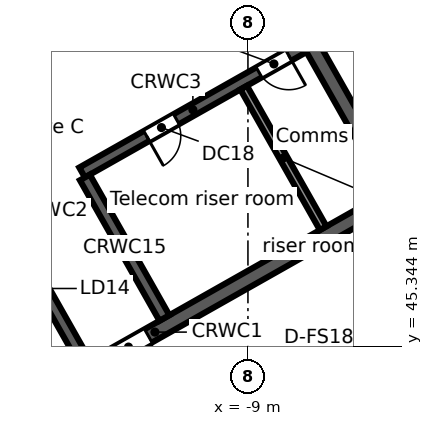
"""IFC4 building model, lengths in metres.
Left out: names, types, materials, properties, quantities, classifications, styles, units other than length and angle.
Written with IfcOpenShell. Run it as: python <this file> out.ifc"""

import sys

from ifc_helpers import new_model, si_unit, direction, frame, frame_2d, origin, place, context, subcontext, project, spatial, rectangle, extrude, element, fill, save


model = new_model("IFC4")
c1 = context("Model", 3, precision=1e-05, world=origin(), true_north=direction((0.0, 1.0)))
c2 = subcontext(c1, "Body", "Model", "MODEL_VIEW")
j1 = project(units=[si_unit("LENGTHUNIT", "METRE"), si_unit("PLANEANGLEUNIT", "RADIAN")], contexts=[c1])
p1 = place(None, origin())
s1 = spatial("IfcSite", under=j1, at=p1, CompositionType="ELEMENT")
p2 = place(p1, origin())
s2 = spatial("IfcBuilding", under=s1, at=p2, CompositionType="ELEMENT")
p3 = place(p2, frame((0.0, 0.0, 281.7)))
s3 = spatial("IfcBuildingStorey", under=s2, at=p3, CompositionType="ELEMENT", Elevation=281.7)
p4 = place(p3, frame((-58.732, 38.771, 0.0), z_axis=(0.0, 0.0, 1.0), x_axis=(0.870355615581, 0.492423702137, 0.0)))
e1 = element("IfcWall", 1, at=p4, inside=s3, PredefinedType="STANDARD", context=c2, shape_type="SweptSolid", body=[
    extrude(rectangle(XDim=64.052, YDim=0.25, at=frame_2d((32.026, 0.0))), origin(), (0.0, 0.0, 1.0), 3.45),
])
p5 = place(p4, frame((61.259, 0.0, 0.8)))
e2 = element("IfcOpeningElement", 2, at=p5, cuts=e1, PredefinedType="OPENING", context=c2, shape_type="SweptSolid", body=[
    extrude(rectangle(XDim=2.4, YDim=2.2, at=frame_2d((1.2, 1.1))), frame((0.0, 0.135, 0.0), z_axis=(0.0, -1.0, 0.0), x_axis=(1.0, 0.0, 0.0)), (0.0, 0.0, 1.0), 0.27),
])
p6 = place(p4, frame((58.216, 0.0, 0.8)))
e3 = element("IfcOpeningElement", 3, at=p6, cuts=e1, PredefinedType="OPENING", context=c2, shape_type="SweptSolid", body=[
    extrude(rectangle(XDim=2.4, YDim=2.2, at=frame_2d((1.2, 1.1))), frame((0.0, 0.135, 0.0), z_axis=(0.0, -1.0, 0.0), x_axis=(1.0, 0.0, 0.0)), (0.0, 0.0, 1.0), 0.27),
])
p7 = place(p4, frame((55.173, 0.0, 0.8)))
e4 = element("IfcOpeningElement", 4, at=p7, cuts=e1, PredefinedType="OPENING", context=c2, shape_type="SweptSolid", body=[
    extrude(rectangle(XDim=2.4, YDim=2.2, at=frame_2d((1.2, 1.1))), frame((0.0, 0.135, 0.0), z_axis=(0.0, -1.0, 0.0), x_axis=(1.0, 0.0, 0.0)), (0.0, 0.0, 1.0), 0.27),
])
p8 = place(p4, frame((52.129, 0.0, 0.8)))
e5 = element("IfcOpeningElement", 5, at=p8, cuts=e1, PredefinedType="OPENING", context=c2, shape_type="SweptSolid", body=[
    extrude(rectangle(XDim=2.4, YDim=2.2, at=frame_2d((1.2, 1.1))), frame((0.0, 0.135, 0.0), z_axis=(0.0, -1.0, 0.0), x_axis=(1.0, 0.0, 0.0)), (0.0, 0.0, 1.0), 0.27),
])
p9 = place(p4, frame((49.086, 0.0, 0.8)))
e6 = element("IfcOpeningElement", 6, at=p9, cuts=e1, PredefinedType="OPENING", context=c2, shape_type="SweptSolid", body=[
    extrude(rectangle(XDim=2.4, YDim=2.2, at=frame_2d((1.2, 1.1))), frame((0.0, 0.135, 0.0), z_axis=(0.0, -1.0, 0.0), x_axis=(1.0, 0.0, 0.0)), (0.0, 0.0, 1.0), 0.27),
])
p10 = place(p4, frame((46.043, 0.0, 0.8)))
e7 = element("IfcOpeningElement", 7, at=p10, cuts=e1, PredefinedType="OPENING", context=c2, shape_type="SweptSolid", body=[
    extrude(rectangle(XDim=2.4, YDim=2.2, at=frame_2d((1.2, 1.1))), frame((0.0, 0.135, 0.0), z_axis=(0.0, -1.0, 0.0), x_axis=(1.0, 0.0, 0.0)), (0.0, 0.0, 1.0), 0.27),
])
p11 = place(p4, frame((43.0, 0.0, 0.8)))
e8 = element("IfcOpeningElement", 8, at=p11, cuts=e1, PredefinedType="OPENING", context=c2, shape_type="SweptSolid", body=[
    extrude(rectangle(XDim=2.4, YDim=2.2, at=frame_2d((1.2, 1.1))), frame((0.0, 0.135, 0.0), z_axis=(0.0, -1.0, 0.0), x_axis=(1.0, 0.0, 0.0)), (0.0, 0.0, 1.0), 0.27),
])
p12 = place(p4, frame((39.956, 0.0, 0.8)))
e9 = element("IfcOpeningElement", 9, at=p12, cuts=e1, PredefinedType="OPENING", context=c2, shape_type="SweptSolid", body=[
    extrude(rectangle(XDim=2.4, YDim=2.2, at=frame_2d((1.2, 1.1))), frame((0.0, 0.135, 0.0), z_axis=(0.0, -1.0, 0.0), x_axis=(1.0, 0.0, 0.0)), (0.0, 0.0, 1.0), 0.27),
])
p13 = place(p4, frame((36.913, 0.0, 0.8)))
e10 = element("IfcOpeningElement", 10, at=p13, cuts=e1, PredefinedType="OPENING", context=c2, shape_type="SweptSolid", body=[
    extrude(rectangle(XDim=2.4, YDim=2.2, at=frame_2d((1.2, 1.1))), frame((0.0, 0.135, 0.0), z_axis=(0.0, -1.0, 0.0), x_axis=(1.0, 0.0, 0.0)), (0.0, 0.0, 1.0), 0.27),
])
p14 = place(p4, frame((33.87, 0.0, 0.8)))
e11 = element("IfcOpeningElement", 11, at=p14, cuts=e1, PredefinedType="OPENING", context=c2, shape_type="SweptSolid", body=[
    extrude(rectangle(XDim=2.4, YDim=2.2, at=frame_2d((1.2, 1.1))), frame((0.0, 0.135, 0.0), z_axis=(0.0, -1.0, 0.0), x_axis=(1.0, 0.0, 0.0)), (0.0, 0.0, 1.0), 0.27),
])
p15 = place(p4, frame((30.826, 0.0, 0.8)))
e12 = element("IfcOpeningElement", 12, at=p15, cuts=e1, PredefinedType="OPENING", context=c2, shape_type="SweptSolid", body=[
    extrude(rectangle(XDim=2.4, YDim=2.2, at=frame_2d((1.2, 1.1))), frame((0.0, 0.135, 0.0), z_axis=(0.0, -1.0, 0.0), x_axis=(1.0, 0.0, 0.0)), (0.0, 0.0, 1.0), 0.27),
])
p16 = place(p4, frame((27.783, 0.0, 0.8)))
e13 = element("IfcOpeningElement", 13, at=p16, cuts=e1, PredefinedType="OPENING", context=c2, shape_type="SweptSolid", body=[
    extrude(rectangle(XDim=2.4, YDim=2.2, at=frame_2d((1.2, 1.1))), frame((0.0, 0.135, 0.0), z_axis=(0.0, -1.0, 0.0), x_axis=(1.0, 0.0, 0.0)), (0.0, 0.0, 1.0), 0.27),
])
p17 = place(p4, frame((24.74, 0.0, 0.8)))
e14 = element("IfcOpeningElement", 14, at=p17, cuts=e1, PredefinedType="OPENING", context=c2, shape_type="SweptSolid", body=[
    extrude(rectangle(XDim=2.4, YDim=2.2, at=frame_2d((1.2, 1.1))), frame((0.0, 0.135, 0.0), z_axis=(0.0, -1.0, 0.0), x_axis=(1.0, 0.0, 0.0)), (0.0, 0.0, 1.0), 0.27),
])
p18 = place(p4, frame((21.696, 0.0, 0.8)))
e15 = element("IfcOpeningElement", 15, at=p18, cuts=e1, PredefinedType="OPENING", context=c2, shape_type="SweptSolid", body=[
    extrude(rectangle(XDim=2.4, YDim=2.2, at=frame_2d((1.2, 1.1))), frame((0.0, 0.135, 0.0), z_axis=(0.0, -1.0, 0.0), x_axis=(1.0, 0.0, 0.0)), (0.0, 0.0, 1.0), 0.27),
])
p19 = place(p4, frame((18.653, 0.0, 0.8)))
e16 = element("IfcOpeningElement", 16, at=p19, cuts=e1, PredefinedType="OPENING", context=c2, shape_type="SweptSolid", body=[
    extrude(rectangle(XDim=2.4, YDim=2.2, at=frame_2d((1.2, 1.1))), frame((0.0, 0.135, 0.0), z_axis=(0.0, -1.0, 0.0), x_axis=(1.0, 0.0, 0.0)), (0.0, 0.0, 1.0), 0.27),
])
p20 = place(p4, frame((15.61, 0.0, 0.8)))
e17 = element("IfcOpeningElement", 17, at=p20, cuts=e1, PredefinedType="OPENING", context=c2, shape_type="SweptSolid", body=[
    extrude(rectangle(XDim=2.4, YDim=2.2, at=frame_2d((1.2, 1.1))), frame((0.0, 0.135, 0.0), z_axis=(0.0, -1.0, 0.0), x_axis=(1.0, 0.0, 0.0)), (0.0, 0.0, 1.0), 0.27),
])
p21 = place(p4, frame((12.567, 0.0, 0.8)))
e18 = element("IfcOpeningElement", 18, at=p21, cuts=e1, PredefinedType="OPENING", context=c2, shape_type="SweptSolid", body=[
    extrude(rectangle(XDim=2.4, YDim=2.2, at=frame_2d((1.2, 1.1))), frame((0.0, 0.135, 0.0), z_axis=(0.0, -1.0, 0.0), x_axis=(1.0, 0.0, 0.0)), (0.0, 0.0, 1.0), 0.27),
])
p22 = place(p4, frame((9.523, 0.0, 0.8)))
e19 = element("IfcOpeningElement", 19, at=p22, cuts=e1, PredefinedType="OPENING", context=c2, shape_type="SweptSolid", body=[
    extrude(rectangle(XDim=2.4, YDim=2.2, at=frame_2d((1.2, 1.1))), frame((0.0, 0.135, 0.0), z_axis=(0.0, -1.0, 0.0), x_axis=(1.0, 0.0, 0.0)), (0.0, 0.0, 1.0), 0.27),
])
p23 = place(p4, frame((6.48, 0.0, 0.8)))
e20 = element("IfcOpeningElement", 20, at=p23, cuts=e1, PredefinedType="OPENING", context=c2, shape_type="SweptSolid", body=[
    extrude(rectangle(XDim=2.4, YDim=2.2, at=frame_2d((1.2, 1.1))), frame((0.0, 0.135, 0.0), z_axis=(0.0, -1.0, 0.0), x_axis=(1.0, 0.0, 0.0)), (0.0, 0.0, 1.0), 0.27),
])
p24 = place(p4, frame((3.437, 0.0, 0.8)))
e21 = element("IfcOpeningElement", 21, at=p24, cuts=e1, PredefinedType="OPENING", context=c2, shape_type="SweptSolid", body=[
    extrude(rectangle(XDim=2.4, YDim=2.2, at=frame_2d((1.2, 1.1))), frame((0.0, 0.135, 0.0), z_axis=(0.0, -1.0, 0.0), x_axis=(1.0, 0.0, 0.0)), (0.0, 0.0, 1.0), 0.27),
])
p25 = place(p4, frame((0.393, 0.0, 0.8)))
e22 = element("IfcOpeningElement", 22, at=p25, cuts=e1, PredefinedType="OPENING", context=c2, shape_type="SweptSolid", body=[
    extrude(rectangle(XDim=2.4, YDim=2.2, at=frame_2d((1.2, 1.1))), frame((0.0, 0.135, 0.0), z_axis=(0.0, -1.0, 0.0), x_axis=(1.0, 0.0, 0.0)), (0.0, 0.0, 1.0), 0.27),
])
p26 = place(p3, frame((-3.017, 46.293, 0.0), z_axis=(0.0, 0.0, 1.0), x_axis=(-0.870355474887, -0.492423950812, 0.0)))
e23 = element("IfcWall", 23, at=p26, inside=s3, PredefinedType="STANDARD", context=c2, shape_type="SweptSolid", body=[
    extrude(rectangle(XDim=40.34, YDim=0.25, at=frame_2d((20.17, 0.0))), origin(), (0.0, 0.0, 1.0), 3.45),
])
p27 = place(p26, frame((37.428, 0.0, 0.8)))
e24 = element("IfcOpeningElement", 24, at=p27, cuts=e23, PredefinedType="OPENING", context=c2, shape_type="SweptSolid", body=[
    extrude(rectangle(XDim=2.4, YDim=2.2, at=frame_2d((1.2, 1.1))), frame((0.0, 0.135, 0.0), z_axis=(0.0, -1.0, 0.0), x_axis=(1.0, 0.0, 0.0)), (0.0, 0.0, 1.0), 0.27),
])
p28 = place(p26, frame((34.372, 0.0, 0.0)))
e25 = element("IfcOpeningElement", 25, at=p28, cuts=e23, PredefinedType="OPENING", context=c2, shape_type="SweptSolid", body=[
    extrude(rectangle(XDim=1.8, YDim=2.4, at=frame_2d((0.9, 1.2))), frame((0.0, 0.135, 0.0), z_axis=(0.0, -1.0, 0.0), x_axis=(1.0, 0.0, 0.0)), (0.0, 0.0, 1.0), 0.27),
])
p29 = place(p26, frame((30.716, 0.0, 0.8)))
e26 = element("IfcOpeningElement", 26, at=p29, cuts=e23, PredefinedType="OPENING", context=c2, shape_type="SweptSolid", body=[
    extrude(rectangle(XDim=2.4, YDim=2.2, at=frame_2d((1.2, 1.1))), frame((0.0, 0.135, 0.0), z_axis=(0.0, -1.0, 0.0), x_axis=(1.0, 0.0, 0.0)), (0.0, 0.0, 1.0), 0.27),
])
p30 = place(p26, frame((27.36, 0.0, 0.8)))
e27 = element("IfcOpeningElement", 27, at=p30, cuts=e23, PredefinedType="OPENING", context=c2, shape_type="SweptSolid", body=[
    extrude(rectangle(XDim=2.4, YDim=2.2, at=frame_2d((1.2, 1.1))), frame((0.0, 0.135, 0.0), z_axis=(0.0, -1.0, 0.0), x_axis=(1.0, 0.0, 0.0)), (0.0, 0.0, 1.0), 0.27),
])
p31 = place(p26, frame((24.304, 0.0, 0.0)))
e28 = element("IfcOpeningElement", 28, at=p31, cuts=e23, PredefinedType="OPENING", context=c2, shape_type="SweptSolid", body=[
    extrude(rectangle(XDim=1.8, YDim=2.4, at=frame_2d((0.9, 1.2))), frame((0.0, 0.135, 0.0), z_axis=(0.0, -1.0, 0.0), x_axis=(1.0, 0.0, 0.0)), (0.0, 0.0, 1.0), 0.27),
])
p32 = place(p26, frame((20.648, 0.0, 0.8)))
e29 = element("IfcOpeningElement", 29, at=p32, cuts=e23, PredefinedType="OPENING", context=c2, shape_type="SweptSolid", body=[
    extrude(rectangle(XDim=2.4, YDim=2.2, at=frame_2d((1.2, 1.1))), frame((0.0, 0.135, 0.0), z_axis=(0.0, -1.0, 0.0), x_axis=(1.0, 0.0, 0.0)), (0.0, 0.0, 1.0), 0.27),
])
p33 = place(p26, frame((17.292, 0.0, 0.8)))
e30 = element("IfcOpeningElement", 30, at=p33, cuts=e23, PredefinedType="OPENING", context=c2, shape_type="SweptSolid", body=[
    extrude(rectangle(XDim=2.4, YDim=2.2, at=frame_2d((1.2, 1.1))), frame((0.0, 0.135, 0.0), z_axis=(0.0, -1.0, 0.0), x_axis=(1.0, 0.0, 0.0)), (0.0, 0.0, 1.0), 0.27),
])
p34 = place(p26, frame((14.236, 0.0, 0.0)))
e31 = element("IfcOpeningElement", 31, at=p34, cuts=e23, PredefinedType="OPENING", context=c2, shape_type="SweptSolid", body=[
    extrude(rectangle(XDim=1.8, YDim=2.4, at=frame_2d((0.9, 1.2))), frame((0.0, 0.135, 0.0), z_axis=(0.0, -1.0, 0.0), x_axis=(1.0, 0.0, 0.0)), (0.0, 0.0, 1.0), 0.27),
])
p35 = place(p26, frame((10.58, 0.0, 0.8)))
e32 = element("IfcOpeningElement", 32, at=p35, cuts=e23, PredefinedType="OPENING", context=c2, shape_type="SweptSolid", body=[
    extrude(rectangle(XDim=2.4, YDim=2.2, at=frame_2d((1.2, 1.1))), frame((0.0, 0.135, 0.0), z_axis=(0.0, -1.0, 0.0), x_axis=(1.0, 0.0, 0.0)), (0.0, 0.0, 1.0), 0.27),
])
p36 = place(p26, frame((7.224, 0.0, 0.8)))
e33 = element("IfcOpeningElement", 33, at=p36, cuts=e23, PredefinedType="OPENING", context=c2, shape_type="SweptSolid", body=[
    extrude(rectangle(XDim=2.4, YDim=2.2, at=frame_2d((1.2, 1.1))), frame((0.0, 0.135, 0.0), z_axis=(0.0, -1.0, 0.0), x_axis=(1.0, 0.0, 0.0)), (0.0, 0.0, 1.0), 0.27),
])
p37 = place(p26, frame((4.168, 0.0, 0.0)))
e34 = element("IfcOpeningElement", 34, at=p37, cuts=e23, PredefinedType="OPENING", context=c2, shape_type="SweptSolid", body=[
    extrude(rectangle(XDim=1.8, YDim=2.4, at=frame_2d((0.9, 1.2))), frame((0.0, 0.135, 0.0), z_axis=(0.0, -1.0, 0.0), x_axis=(1.0, 0.0, 0.0)), (0.0, 0.0, 1.0), 0.27),
])
p38 = place(p26, frame((0.512, 0.0, 0.8)))
e35 = element("IfcOpeningElement", 35, at=p38, cuts=e23, PredefinedType="OPENING", context=c2, shape_type="SweptSolid", body=[
    extrude(rectangle(XDim=2.4, YDim=2.2, at=frame_2d((1.2, 1.1))), frame((0.0, 0.135, 0.0), z_axis=(0.0, -1.0, 0.0), x_axis=(1.0, 0.0, 0.0)), (0.0, 0.0, 1.0), 0.27),
])
p39 = place(p3, frame((-17.975, 42.017, 0.0), z_axis=(0.0, 0.0, 1.0), x_axis=(0.87034965173, 0.492434243055, 0.0)))
e36 = element("IfcWall", 36, at=p39, inside=s3, PredefinedType="SOLIDWALL", context=c2, shape_type="SweptSolid", body=[
    extrude(rectangle(XDim=15.0, YDim=0.4, at=frame_2d((7.5, 0.0))), origin(), (0.0, 0.0, 1.0), 3.45),
])
p40 = place(p39, frame((6.1, 0.0, 0.0)))
e37 = element("IfcOpeningElement", 37, at=p40, cuts=e36, PredefinedType="OPENING", context=c2, shape_type="SweptSolid", body=[
    extrude(rectangle(XDim=1.2, YDim=2.1, at=frame_2d((0.6, 1.05))), frame((0.0, 0.21, 0.0), z_axis=(0.0, -1.0, 0.0), x_axis=(1.0, 0.0, 0.0)), (0.0, 0.0, 1.0), 0.42),
])
p41 = place(p3, frame((-13.365, 49.911, 0.0), z_axis=(0.0, 0.0, 1.0), x_axis=(0.870347618718, 0.492437836272, 0.0)))
e38 = element("IfcWall", 38, at=p41, inside=s3, PredefinedType="SOLIDWALL", context=c2, shape_type="SweptSolid", body=[
    extrude(rectangle(XDim=6.7, YDim=0.3, at=frame_2d((3.35, 0.0))), origin(), (0.0, 0.0, 1.0), 3.45),
])
p42 = place(p41, frame((1.95, 0.0, 0.0)))
e39 = element("IfcOpeningElement", 39, at=p42, cuts=e38, PredefinedType="OPENING", context=c2, shape_type="SweptSolid", body=[
    extrude(rectangle(XDim=0.9, YDim=2.1, at=frame_2d((0.45, 1.05))), frame((0.0, 0.16, 0.0), z_axis=(0.0, -1.0, 0.0), x_axis=(1.0, 0.0, 0.0)), (0.0, 0.0, 1.0), 0.32),
])
p43 = place(p41, frame((5.35, 0.0, 0.0)))
e40 = element("IfcOpeningElement", 40, at=p43, cuts=e38, PredefinedType="OPENING", context=c2, shape_type="SweptSolid", body=[
    extrude(rectangle(XDim=0.9, YDim=2.1, at=frame_2d((0.45, 1.05))), frame((0.0, 0.16, 0.0), z_axis=(0.0, -1.0, 0.0), x_axis=(1.0, 0.0, 0.0)), (0.0, 0.0, 1.0), 0.32),
])
p44 = place(p3, frame((-15.379, 48.599, 0.0), z_axis=(0.0, 0.0, 1.0), x_axis=(0.492422543467, -0.870356271124, 0.0)))
e41 = element("IfcWall", 41, at=p44, inside=s3, PredefinedType="SOLIDWALL", context=c2, shape_type="SweptSolid", body=[
    extrude(rectangle(XDim=4.25, YDim=0.3, at=frame_2d((2.125, 0.0))), origin(), (0.0, 0.0, 1.0), 3.45),
])
p45 = place(p3, frame((-13.291, 49.781, 0.0), z_axis=(0.0, 0.0, 1.0), x_axis=(0.492397924348, -0.870370199454, 0.0)))
e42 = element("IfcWall", 42, at=p45, inside=s3, PredefinedType="SOLIDWALL", context=c2, shape_type="SweptSolid", body=[
    extrude(rectangle(XDim=4.25, YDim=0.3, at=frame_2d((2.125, 0.0))), origin(), (0.0, 0.0, 1.0), 3.45),
])
p46 = place(p3, frame((-9.113, 52.144, 0.0), z_axis=(0.0, 0.0, 1.0), x_axis=(0.492422543467, -0.870356271124, 0.0)))
e43 = element("IfcWall", 43, at=p46, inside=s3, PredefinedType="PARTITIONING", context=c2, shape_type="SweptSolid", body=[
    extrude(rectangle(XDim=4.25, YDim=0.2, at=frame_2d((2.125, 0.0))), origin(), (0.0, 0.0, 1.0), 3.45),
])
p47 = place(p3, frame((-11.692, 60.968, 0.0), z_axis=(0.0, 0.0, 1.0), x_axis=(0.492421663121, -0.870356769198, 0.0)))
e44 = element("IfcWall", 44, at=p47, inside=s3, PredefinedType="SOLIDWALL", context=c2, shape_type="SweptSolid", body=[
    extrude(rectangle(XDim=13.2, YDim=0.4, at=frame_2d((6.6, 0.0))), origin(), (0.0, 0.0, 1.0), 3.45),
])
p48 = place(p40, frame((1.2, 0.0, 0.0), z_axis=(0.0, 0.0, 1.0), x_axis=(-1.0, 0.0, 0.0)))
e45 = element("IfcDoor", 45, at=p48, inside=s3, OperationType="SINGLE_SWING_RIGHT", PredefinedType="DOOR", context=c2, shape_type="SweptSolid", body=[
    extrude(rectangle(XDim=1.2, YDim=2.1, at=frame_2d((0.6, 1.05))), frame((0.0, 0.025, 0.0), z_axis=(0.0, -1.0, 0.0), x_axis=(1.0, 0.0, 0.0)), (0.0, 0.0, 1.0), 0.05),
])
fill(e37, e45)
p49 = place(p42, frame((0.9, 0.0, 0.0), z_axis=(0.0, 0.0, 1.0), x_axis=(-1.0, 0.0, 0.0)))
e46 = element("IfcDoor", 46, at=p49, inside=s3, OperationType="SINGLE_SWING_RIGHT", PredefinedType="DOOR", context=c2, shape_type="SweptSolid", body=[
    extrude(rectangle(XDim=0.9, YDim=2.1, at=frame_2d((0.45, 1.05))), frame((0.0, 0.025, 0.0), z_axis=(0.0, -1.0, 0.0), x_axis=(1.0, 0.0, 0.0)), (0.0, 0.0, 1.0), 0.05),
])
fill(e39, e46)
p50 = place(p43, frame((0.9, 0.0, 0.0), z_axis=(0.0, 0.0, 1.0), x_axis=(-1.0, 0.0, 0.0)))
e47 = element("IfcDoor", 47, at=p50, inside=s3, OperationType="SINGLE_SWING_LEFT", PredefinedType="DOOR", context=c2, shape_type="SweptSolid", body=[
    extrude(rectangle(XDim=0.9, YDim=2.1, at=frame_2d((0.45, 1.05))), frame((0.0, 0.025, 0.0), z_axis=(0.0, -1.0, 0.0), x_axis=(1.0, 0.0, 0.0)), (0.0, 0.0, 1.0), 0.05),
])
fill(e40, e47)
save(model, sys.argv[1])
